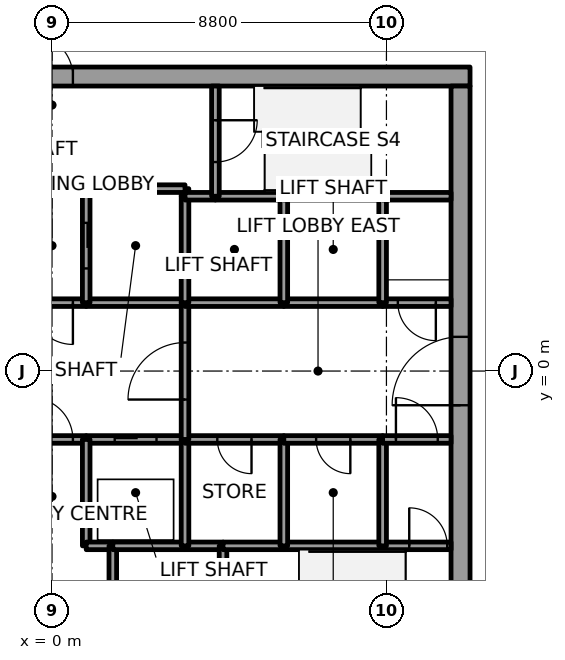
"""IFC4 building model, lengths in metres.
Left out: names, types, materials, properties, quantities, classifications, styles, units other than length and angle.
Written with IfcOpenShell. Run it as: python <this file> out.ifc"""

import sys

from ifc_helpers import new_model, si_unit, direction, frame, frame_2d, origin, place, context, subcontext, project, spatial, rectangle, extrude, element, fill, save


model = new_model("IFC4")
c1 = context("Model", 3, precision=1e-05, world=origin(), true_north=direction((0.0, 1.0)))
c2 = subcontext(c1, "Body", "Model", "MODEL_VIEW")
j1 = project(units=[si_unit("LENGTHUNIT", "METRE"), si_unit("PLANEANGLEUNIT", "RADIAN")], contexts=[c1])
p1 = place(None, origin())
s1 = spatial("IfcSite", under=j1, at=p1, CompositionType="ELEMENT")
p2 = place(p1, origin())
s2 = spatial("IfcBuilding", under=s1, at=p2, CompositionType="ELEMENT")
p3 = place(p2, frame((0.0, 0.0, 22.2)))
s3 = spatial("IfcBuildingStorey", under=s2, at=p3, CompositionType="ELEMENT", Elevation=22.2)
p4 = place(p3, frame((-11.0, 7.75, 0.0), z_axis=(0.0, 0.0, 1.0), x_axis=(1.0, 0.0, 0.0)))
e1 = element("IfcWall", 1, at=p4, inside=s3, PredefinedType="SHEAR", context=c2, shape_type="SweptSolid", body=[
    extrude(rectangle(XDim=22.0, YDim=0.5, at=frame_2d((11.0, 0.0))), origin(), (0.0, 0.0, 1.0), 6.6),
])
p5 = place(p4, frame((10.45, 0.0, 0.0)))
e2 = element("IfcOpeningElement", 2, at=p5, cuts=e1, PredefinedType="OPENING", context=c2, shape_type="SweptSolid", body=[
    extrude(rectangle(XDim=1.1, YDim=2.1, at=frame_2d((0.55, 1.05))), frame((0.0, 0.25, 0.0), z_axis=(0.0, -1.0, 0.0), x_axis=(1.0, 0.0, 0.0)), (0.0, 0.0, 1.0), 0.5),
])
p6 = place(p3, frame((10.75, -7.5, 0.0), z_axis=(0.0, 0.0, 1.0), x_axis=(0.0, 1.0, 0.0)))
e3 = element("IfcWall", 3, at=p6, inside=s3, PredefinedType="SHEAR", context=c2, shape_type="SweptSolid", body=[
    extrude(rectangle(XDim=15.0, YDim=0.5, at=frame_2d((7.5, 0.0))), origin(), (0.0, 0.0, 1.0), 6.6),
])
p7 = place(p6, frame((6.6, 0.0, 0.0)))
e4 = element("IfcOpeningElement", 4, at=p7, cuts=e3, PredefinedType="OPENING", context=c2, shape_type="SweptSolid", body=[
    extrude(rectangle(XDim=1.8, YDim=2.1, at=frame_2d((0.9, 1.05))), frame((0.0, 0.25, 0.0), z_axis=(0.0, -1.0, 0.0), x_axis=(1.0, 0.0, 0.0)), (0.0, 0.0, 1.0), 0.5),
])
p8 = place(p3, frame((-0.9, -1.8, 0.0), z_axis=(0.0, 0.0, 1.0), x_axis=(1.0, 0.0, 0.0)))
e5 = element("IfcWall", 5, at=p8, inside=s3, PredefinedType="SOLIDWALL", context=c2, shape_type="SweptSolid", body=[
    extrude(rectangle(XDim=1.8, YDim=0.2, at=frame_2d((0.9, 0.0))), origin(), (0.0, 0.0, 1.0), 6.35),
])
p9 = place(p8, frame((0.35, 0.0, 0.0)))
e6 = element("IfcOpeningElement", 6, at=p9, cuts=e5, PredefinedType="OPENING", context=c2, shape_type="SweptSolid", body=[
    extrude(rectangle(XDim=1.1, YDim=2.4, at=frame_2d((0.55, 1.2))), frame((0.0, 0.1, 0.0), z_axis=(0.0, -1.0, 0.0), x_axis=(1.0, 0.0, 0.0)), (0.0, 0.0, 1.0), 0.2),
])
p10 = place(p3, frame((0.9, 1.8, 0.0), z_axis=(0.0, 0.0, 1.0), x_axis=(-1.0, 0.0, 0.0)))
e7 = element("IfcWall", 7, at=p10, inside=s3, PredefinedType="SOLIDWALL", context=c2, shape_type="SweptSolid", body=[
    extrude(rectangle(XDim=1.8, YDim=0.2, at=frame_2d((0.9, 0.0))), origin(), (0.0, 0.0, 1.0), 6.35),
])
p11 = place(p10, frame((0.35, 0.0, 0.0)))
e8 = element("IfcOpeningElement", 8, at=p11, cuts=e7, PredefinedType="OPENING", context=c2, shape_type="SweptSolid", body=[
    extrude(rectangle(XDim=1.1, YDim=2.4, at=frame_2d((0.55, 1.2))), frame((0.0, 0.1, 0.0), z_axis=(0.0, -1.0, 0.0), x_axis=(1.0, 0.0, 0.0)), (0.0, 0.0, 1.0), 0.2),
])
p12 = place(p3, frame((0.9, -1.8, 0.0), z_axis=(0.0, 0.0, 1.0), x_axis=(1.0, 0.0, 0.0)))
e9 = element("IfcWall", 9, at=p12, inside=s3, PredefinedType="SOLIDWALL", context=c2, shape_type="SweptSolid", body=[
    extrude(rectangle(XDim=2.6, YDim=0.2, at=frame_2d((1.3, 0.0))), origin(), (0.0, 0.0, 1.0), 6.35),
])
p13 = place(p12, frame((0.75, 0.0, 0.0)))
e10 = element("IfcOpeningElement", 10, at=p13, cuts=e9, PredefinedType="OPENING", context=c2, shape_type="SweptSolid", body=[
    extrude(rectangle(XDim=1.1, YDim=2.1, at=frame_2d((0.55, 1.05))), frame((0.0, 0.1, 0.0), z_axis=(0.0, -1.0, 0.0), x_axis=(1.0, 0.0, 0.0)), (0.0, 0.0, 1.0), 0.2),
])
p14 = place(p3, frame((0.9, -1.8, 0.0), z_axis=(0.0, 0.0, 1.0), x_axis=(0.0, -1.0, 0.0)))
e11 = element("IfcWall", 11, at=p14, inside=s3, PredefinedType="SOLIDWALL", context=c2, shape_type="SweptSolid", body=[
    extrude(rectangle(XDim=2.8, YDim=0.2, at=frame_2d((1.4, 0.0))), origin(), (0.0, 0.0, 1.0), 6.35),
])
p15 = place(p3, frame((0.9, -4.6, 0.0), z_axis=(0.0, 0.0, 1.0), x_axis=(1.0, 0.0, 0.0)))
e12 = element("IfcWall", 12, at=p15, inside=s3, PredefinedType="SOLIDWALL", context=c2, shape_type="SweptSolid", body=[
    extrude(rectangle(XDim=0.7, YDim=0.2, at=frame_2d((0.35, 0.0))), origin(), (0.0, 0.0, 1.0), 6.35),
])
p16 = place(p3, frame((3.5, 1.8, 0.0), z_axis=(0.0, 0.0, 1.0), x_axis=(-1.0, 0.0, 0.0)))
e13 = element("IfcWall", 13, at=p16, inside=s3, PredefinedType="SOLIDWALL", context=c2, shape_type="SweptSolid", body=[
    extrude(rectangle(XDim=2.6, YDim=0.2, at=frame_2d((1.3, 0.0))), origin(), (0.0, 0.0, 1.0), 6.35),
])
p17 = place(p3, frame((3.5, 4.6, 0.0), z_axis=(0.0, 0.0, 1.0), x_axis=(0.0, 1.0, 0.0)))
e14 = element("IfcWall", 14, at=p17, inside=s3, PredefinedType="SOLIDWALL", context=c2, shape_type="SweptSolid", body=[
    extrude(rectangle(XDim=0.2, YDim=0.2, at=frame_2d((0.1, 0.0))), origin(), (0.0, 0.0, 1.0), 6.35),
])
p18 = place(p3, frame((3.5, 4.8, 0.0), z_axis=(0.0, 0.0, 1.0), x_axis=(-1.0, 0.0, 0.0)))
e15 = element("IfcWall", 15, at=p18, inside=s3, PredefinedType="SOLIDWALL", context=c2, shape_type="SweptSolid", body=[
    extrude(rectangle(XDim=2.6, YDim=0.2, at=frame_2d((1.3, 0.0))), origin(), (0.0, 0.0, 1.0), 6.35),
])
p19 = place(p3, frame((0.9, 4.8, 0.0), z_axis=(0.0, 0.0, 1.0), x_axis=(0.0, -1.0, 0.0)))
e16 = element("IfcWall", 16, at=p19, inside=s3, PredefinedType="SOLIDWALL", context=c2, shape_type="SweptSolid", body=[
    extrude(rectangle(XDim=3.0, YDim=0.2, at=frame_2d((1.5, 0.0))), origin(), (0.0, 0.0, 1.0), 6.35),
])
p20 = place(p19, frame((0.9, 0.0, 0.0)))
e17 = element("IfcOpeningElement", 17, at=p20, cuts=e16, PredefinedType="OPENING", context=c2, shape_type="SweptSolid", body=[
    extrude(rectangle(XDim=1.2, YDim=2.1, at=frame_2d((0.6, 1.05))), frame((0.0, 0.1, 0.0), z_axis=(0.0, -1.0, 0.0), x_axis=(1.0, 0.0, 0.0)), (0.0, 0.0, 1.0), 0.2),
])
p21 = place(p3, frame((1.6, -4.6, 0.0), z_axis=(0.0, 0.0, 1.0), x_axis=(0.0, -1.0, 0.0)))
e18 = element("IfcWall", 18, at=p21, inside=s3, PredefinedType="SOLIDWALL", context=c2, shape_type="SweptSolid", body=[
    extrude(rectangle(XDim=2.9, YDim=0.2, at=frame_2d((1.45, 0.0))), origin(), (0.0, 0.0, 1.0), 6.35),
])
p22 = place(p21, frame((1.0, 0.0, 0.0)))
e19 = element("IfcOpeningElement", 19, at=p22, cuts=e18, PredefinedType="OPENING", context=c2, shape_type="SweptSolid", body=[
    extrude(rectangle(XDim=0.9, YDim=2.4, at=frame_2d((0.45, 1.2))), frame((0.0, 0.1, 0.0), z_axis=(0.0, -1.0, 0.0), x_axis=(1.0, 0.0, 0.0)), (0.0, 0.0, 1.0), 0.2),
])
p23 = place(p3, frame((3.5, -4.6, 0.0), z_axis=(0.0, 0.0, 1.0), x_axis=(-1.0, 0.0, 0.0)))
e20 = element("IfcWall", 20, at=p23, inside=s3, PredefinedType="SOLIDWALL", context=c2, shape_type="SweptSolid", body=[
    extrude(rectangle(XDim=1.9, YDim=0.2, at=frame_2d((0.95, 0.0))), origin(), (0.0, 0.0, 1.0), 6.35),
])
p24 = place(p3, frame((3.5, -4.6, 0.0), z_axis=(0.0, 0.0, 1.0), x_axis=(1.0, 0.0, 0.0)))
e21 = element("IfcWall", 21, at=p24, inside=s3, PredefinedType="SOLIDWALL", context=c2, shape_type="SweptSolid", body=[
    extrude(rectangle(XDim=1.0, YDim=0.2, at=frame_2d((0.5, 0.0))), origin(), (0.0, 0.0, 1.0), 6.35),
])
p25 = place(p3, frame((3.5, -1.8, 0.0), z_axis=(0.0, 0.0, 1.0), x_axis=(0.0, -1.0, 0.0)))
e22 = element("IfcWall", 22, at=p25, inside=s3, PredefinedType="SOLIDWALL", context=c2, shape_type="SweptSolid", body=[
    extrude(rectangle(XDim=2.8, YDim=0.2, at=frame_2d((1.4, 0.0))), origin(), (0.0, 0.0, 1.0), 6.35),
])
p26 = place(p3, frame((6.1, -1.8, 0.0), z_axis=(0.0, 0.0, 1.0), x_axis=(-1.0, 0.0, 0.0)))
e23 = element("IfcWall", 23, at=p26, inside=s3, PredefinedType="SOLIDWALL", context=c2, shape_type="SweptSolid", body=[
    extrude(rectangle(XDim=2.6, YDim=0.2, at=frame_2d((1.3, 0.0))), origin(), (0.0, 0.0, 1.0), 6.35),
])
p27 = place(p26, frame((0.85, 0.0, 0.0)))
e24 = element("IfcOpeningElement", 24, at=p27, cuts=e23, PredefinedType="OPENING", context=c2, shape_type="SweptSolid", body=[
    extrude(rectangle(XDim=0.9, YDim=2.4, at=frame_2d((0.45, 1.2))), frame((0.0, 0.1, 0.0), z_axis=(0.0, -1.0, 0.0), x_axis=(1.0, 0.0, 0.0)), (0.0, 0.0, 1.0), 0.2),
])
p28 = place(p3, frame((3.5, -1.8, 0.0), z_axis=(0.0, 0.0, 1.0), x_axis=(0.0, 1.0, 0.0)))
e25 = element("IfcWall", 25, at=p28, inside=s3, PredefinedType="SOLIDWALL", context=c2, shape_type="SweptSolid", body=[
    extrude(rectangle(XDim=3.6, YDim=0.2, at=frame_2d((1.8, 0.0))), origin(), (0.0, 0.0, 1.0), 6.35),
])
p29 = place(p28, frame((1.05, 0.0, 0.0)))
e26 = element("IfcOpeningElement", 26, at=p29, cuts=e25, PredefinedType="OPENING", context=c2, shape_type="SweptSolid", body=[
    extrude(rectangle(XDim=1.5, YDim=2.4, at=frame_2d((0.75, 1.2))), frame((0.0, 0.1, 0.0), z_axis=(0.0, -1.0, 0.0), x_axis=(1.0, 0.0, 0.0)), (0.0, 0.0, 1.0), 0.2),
])
p30 = place(p3, frame((6.1, 1.8, 0.0), z_axis=(0.0, 0.0, 1.0), x_axis=(-1.0, 0.0, 0.0)))
e27 = element("IfcWall", 27, at=p30, inside=s3, PredefinedType="SOLIDWALL", context=c2, shape_type="SweptSolid", body=[
    extrude(rectangle(XDim=2.6, YDim=0.2, at=frame_2d((1.3, 0.0))), origin(), (0.0, 0.0, 1.0), 6.35),
])
p31 = place(p3, frame((3.5, 1.8, 0.0), z_axis=(0.0, 0.0, 1.0), x_axis=(0.0, 1.0, 0.0)))
e28 = element("IfcWall", 28, at=p31, inside=s3, PredefinedType="SOLIDWALL", context=c2, shape_type="SweptSolid", body=[
    extrude(rectangle(XDim=2.8, YDim=0.2, at=frame_2d((1.4, 0.0))), origin(), (0.0, 0.0, 1.0), 6.35),
])
p32 = place(p3, frame((4.3, 4.6, 0.0), z_axis=(0.0, 0.0, 1.0), x_axis=(-1.0, 0.0, 0.0)))
e29 = element("IfcWall", 29, at=p32, inside=s3, PredefinedType="SOLIDWALL", context=c2, shape_type="SweptSolid", body=[
    extrude(rectangle(XDim=0.8, YDim=0.2, at=frame_2d((0.4, 0.0))), origin(), (0.0, 0.0, 1.0), 6.35),
])
p33 = place(p3, frame((6.1, 4.6, 0.0), z_axis=(0.0, 0.0, 1.0), x_axis=(-1.0, 0.0, 0.0)))
e30 = element("IfcWall", 30, at=p33, inside=s3, PredefinedType="SOLIDWALL", context=c2, shape_type="SweptSolid", body=[
    extrude(rectangle(XDim=1.8, YDim=0.2, at=frame_2d((0.9, 0.0))), origin(), (0.0, 0.0, 1.0), 6.35),
])
p34 = place(p3, frame((4.3, 7.5, 0.0), z_axis=(0.0, 0.0, 1.0), x_axis=(0.0, -1.0, 0.0)))
e31 = element("IfcWall", 31, at=p34, inside=s3, PredefinedType="SOLIDWALL", context=c2, shape_type="SweptSolid", body=[
    extrude(rectangle(XDim=2.9, YDim=0.2, at=frame_2d((1.45, 0.0))), origin(), (0.0, 0.0, 1.0), 6.35),
])
p35 = place(p34, frame((0.9, 0.0, 0.0)))
e32 = element("IfcOpeningElement", 32, at=p35, cuts=e31, PredefinedType="OPENING", context=c2, shape_type="SweptSolid", body=[
    extrude(rectangle(XDim=1.1, YDim=2.4, at=frame_2d((0.55, 1.2))), frame((0.0, 0.1, 0.0), z_axis=(0.0, -1.0, 0.0), x_axis=(1.0, 0.0, 0.0)), (0.0, 0.0, 1.0), 0.2),
])
p36 = place(p3, frame((4.5, -7.5, 0.0), z_axis=(0.0, 0.0, 1.0), x_axis=(0.0, 1.0, 0.0)))
e33 = element("IfcWall", 33, at=p36, inside=s3, PredefinedType="SOLIDWALL", context=c2, shape_type="SweptSolid", body=[
    extrude(rectangle(XDim=2.9, YDim=0.2, at=frame_2d((1.45, 0.0))), origin(), (0.0, 0.0, 1.0), 6.35),
])
p37 = place(p3, frame((4.5, -4.6, 0.0), z_axis=(0.0, 0.0, 1.0), x_axis=(1.0, 0.0, 0.0)))
e34 = element("IfcWall", 34, at=p37, inside=s3, PredefinedType="SOLIDWALL", context=c2, shape_type="SweptSolid", body=[
    extrude(rectangle(XDim=1.6, YDim=0.2, at=frame_2d((0.8, 0.0))), origin(), (0.0, 0.0, 1.0), 6.35),
])
p38 = place(p3, frame((6.1, -4.6, 0.0), z_axis=(0.0, 0.0, 1.0), x_axis=(1.0, 0.0, 0.0)))
e35 = element("IfcWall", 35, at=p38, inside=s3, PredefinedType="SOLIDWALL", context=c2, shape_type="SweptSolid", body=[
    extrude(rectangle(XDim=2.6, YDim=0.2, at=frame_2d((1.3, 0.0))), origin(), (0.0, 0.0, 1.0), 6.35),
])
p39 = place(p3, frame((6.1, -4.6, 0.0), z_axis=(0.0, 0.0, 1.0), x_axis=(0.0, 1.0, 0.0)))
e36 = element("IfcWall", 36, at=p39, inside=s3, PredefinedType="SOLIDWALL", context=c2, shape_type="SweptSolid", body=[
    extrude(rectangle(XDim=2.8, YDim=0.2, at=frame_2d((1.4, 0.0))), origin(), (0.0, 0.0, 1.0), 6.35),
])
p40 = place(p3, frame((8.7, -1.8, 0.0), z_axis=(0.0, 0.0, 1.0), x_axis=(-1.0, 0.0, 0.0)))
e37 = element("IfcWall", 37, at=p40, inside=s3, PredefinedType="SOLIDWALL", context=c2, shape_type="SweptSolid", body=[
    extrude(rectangle(XDim=2.6, YDim=0.2, at=frame_2d((1.3, 0.0))), origin(), (0.0, 0.0, 1.0), 6.35),
])
p41 = place(p40, frame((0.85, 0.0, 0.0)))
e38 = element("IfcOpeningElement", 38, at=p41, cuts=e37, PredefinedType="OPENING", context=c2, shape_type="SweptSolid", body=[
    extrude(rectangle(XDim=0.9, YDim=2.4, at=frame_2d((0.45, 1.2))), frame((0.0, 0.1, 0.0), z_axis=(0.0, -1.0, 0.0), x_axis=(1.0, 0.0, 0.0)), (0.0, 0.0, 1.0), 0.2),
])
p42 = place(p3, frame((8.7, 1.8, 0.0), z_axis=(0.0, 0.0, 1.0), x_axis=(-1.0, 0.0, 0.0)))
e39 = element("IfcWall", 39, at=p42, inside=s3, PredefinedType="SOLIDWALL", context=c2, shape_type="SweptSolid", body=[
    extrude(rectangle(XDim=2.6, YDim=0.2, at=frame_2d((1.3, 0.0))), origin(), (0.0, 0.0, 1.0), 6.35),
])
p43 = place(p3, frame((6.1, 1.8, 0.0), z_axis=(0.0, 0.0, 1.0), x_axis=(0.0, 1.0, 0.0)))
e40 = element("IfcWall", 40, at=p43, inside=s3, PredefinedType="SOLIDWALL", context=c2, shape_type="SweptSolid", body=[
    extrude(rectangle(XDim=2.8, YDim=0.2, at=frame_2d((1.4, 0.0))), origin(), (0.0, 0.0, 1.0), 6.35),
])
p44 = place(p3, frame((8.7, 4.6, 0.0), z_axis=(0.0, 0.0, 1.0), x_axis=(-1.0, 0.0, 0.0)))
e41 = element("IfcWall", 41, at=p44, inside=s3, PredefinedType="SOLIDWALL", context=c2, shape_type="SweptSolid", body=[
    extrude(rectangle(XDim=2.6, YDim=0.2, at=frame_2d((1.3, 0.0))), origin(), (0.0, 0.0, 1.0), 6.35),
])
p45 = place(p3, frame((8.7, -4.6, 0.0), z_axis=(0.0, 0.0, 1.0), x_axis=(1.0, 0.0, 0.0)))
e42 = element("IfcWall", 42, at=p45, inside=s3, PredefinedType="SOLIDWALL", context=c2, shape_type="SweptSolid", body=[
    extrude(rectangle(XDim=1.8, YDim=0.2, at=frame_2d((0.9, 0.0))), origin(), (0.0, 0.0, 1.0), 6.35),
])
p46 = place(p45, frame((0.7, 0.0, 0.0)))
e43 = element("IfcOpeningElement", 43, at=p46, cuts=e42, PredefinedType="OPENING", context=c2, shape_type="SweptSolid", body=[
    extrude(rectangle(XDim=1.0, YDim=2.1, at=frame_2d((0.5, 1.05))), frame((0.0, 0.1, 0.0), z_axis=(0.0, -1.0, 0.0), x_axis=(1.0, 0.0, 0.0)), (0.0, 0.0, 1.0), 0.2),
])
p47 = place(p3, frame((8.7, -4.6, 0.0), z_axis=(0.0, 0.0, 1.0), x_axis=(0.0, 1.0, 0.0)))
e44 = element("IfcWall", 44, at=p47, inside=s3, PredefinedType="SOLIDWALL", context=c2, shape_type="SweptSolid", body=[
    extrude(rectangle(XDim=2.8, YDim=0.2, at=frame_2d((1.4, 0.0))), origin(), (0.0, 0.0, 1.0), 6.35),
])
p48 = place(p3, frame((8.7, -1.8, 0.0), z_axis=(0.0, 0.0, 1.0), x_axis=(1.0, 0.0, 0.0)))
e45 = element("IfcWall", 45, at=p48, inside=s3, PredefinedType="SOLIDWALL", context=c2, shape_type="SweptSolid", body=[
    extrude(rectangle(XDim=1.8, YDim=0.2, at=frame_2d((0.9, 0.0))), origin(), (0.0, 0.0, 1.0), 6.35),
])
p49 = place(p48, frame((0.35, 0.0, 0.0)))
e46 = element("IfcOpeningElement", 46, at=p49, cuts=e45, PredefinedType="OPENING", context=c2, shape_type="SweptSolid", body=[
    extrude(rectangle(XDim=1.1, YDim=2.4, at=frame_2d((0.55, 1.2))), frame((0.0, 0.1, 0.0), z_axis=(0.0, -1.0, 0.0), x_axis=(1.0, 0.0, 0.0)), (0.0, 0.0, 1.0), 0.2),
])
p50 = place(p3, frame((10.5, 1.8, 0.0), z_axis=(0.0, 0.0, 1.0), x_axis=(-1.0, 0.0, 0.0)))
e47 = element("IfcWall", 47, at=p50, inside=s3, PredefinedType="SOLIDWALL", context=c2, shape_type="SweptSolid", body=[
    extrude(rectangle(XDim=1.8, YDim=0.2, at=frame_2d((0.9, 0.0))), origin(), (0.0, 0.0, 1.0), 6.35),
])
p51 = place(p50, frame((0.4, 0.0, 0.0)))
e48 = element("IfcOpeningElement", 48, at=p51, cuts=e47, PredefinedType="OPENING", context=c2, shape_type="SweptSolid", body=[
    extrude(rectangle(XDim=1.0, YDim=2.4, at=frame_2d((0.5, 1.2))), frame((0.0, 0.1, 0.0), z_axis=(0.0, -1.0, 0.0), x_axis=(1.0, 0.0, 0.0)), (0.0, 0.0, 1.0), 0.2),
])
p52 = place(p3, frame((8.7, 4.6, 0.0), z_axis=(0.0, 0.0, 1.0), x_axis=(0.0, -1.0, 0.0)))
e49 = element("IfcWall", 49, at=p52, inside=s3, PredefinedType="SOLIDWALL", context=c2, shape_type="SweptSolid", body=[
    extrude(rectangle(XDim=2.8, YDim=0.2, at=frame_2d((1.4, 0.0))), origin(), (0.0, 0.0, 1.0), 6.35),
])
p53 = place(p3, frame((10.5, 4.6, 0.0), z_axis=(0.0, 0.0, 1.0), x_axis=(-1.0, 0.0, 0.0)))
e50 = element("IfcWall", 50, at=p53, inside=s3, PredefinedType="SOLIDWALL", context=c2, shape_type="SweptSolid", body=[
    extrude(rectangle(XDim=1.8, YDim=0.2, at=frame_2d((0.9, 0.0))), origin(), (0.0, 0.0, 1.0), 6.35),
])
p54 = place(p13, origin())
e51 = element("IfcDoor", 51, at=p54, inside=s3, OperationType="SLIDING_TO_LEFT", PredefinedType="DOOR", context=c2, shape_type="SweptSolid", body=[
    extrude(rectangle(XDim=1.1, YDim=2.1, at=frame_2d((0.55, 1.05))), frame((0.0, 0.025, 0.0), z_axis=(0.0, -1.0, 0.0), x_axis=(1.0, 0.0, 0.0)), (0.0, 0.0, 1.0), 0.05),
])
fill(e10, e51)
p55 = place(p20, origin())
e52 = element("IfcDoor", 52, at=p55, inside=s3, OperationType="SLIDING_TO_LEFT", PredefinedType="DOOR", context=c2, shape_type="SweptSolid", body=[
    extrude(rectangle(XDim=1.2, YDim=2.1, at=frame_2d((0.6, 1.05))), frame((0.0, 0.025, 0.0), z_axis=(0.0, -1.0, 0.0), x_axis=(1.0, 0.0, 0.0)), (0.0, 0.0, 1.0), 0.05),
])
fill(e17, e52)
p56 = place(p29, origin())
e53 = element("IfcDoor", 53, at=p56, inside=s3, OperationType="DOUBLE_DOOR_SINGLE_SWING", PredefinedType="DOOR", context=c2, shape_type="SweptSolid", body=[
    extrude(rectangle(XDim=1.5, YDim=2.4, at=frame_2d((0.75, 1.2))), frame((0.0, 0.025, 0.0), z_axis=(0.0, -1.0, 0.0), x_axis=(1.0, 0.0, 0.0)), (0.0, 0.0, 1.0), 0.05),
])
fill(e26, e53)
p57 = place(p49, origin())
e54 = element("IfcDoor", 54, at=p57, inside=s3, OperationType="SINGLE_SWING_RIGHT", PredefinedType="DOOR", context=c2, shape_type="SweptSolid", body=[
    extrude(rectangle(XDim=1.1, YDim=2.4, at=frame_2d((0.55, 1.2))), frame((0.0, 0.025, 0.0), z_axis=(0.0, -1.0, 0.0), x_axis=(1.0, 0.0, 0.0)), (0.0, 0.0, 1.0), 0.05),
])
fill(e46, e54)
p58 = place(p11, origin())
e55 = element("IfcDoor", 55, at=p58, inside=s3, OperationType="SINGLE_SWING_LEFT", PredefinedType="DOOR", context=c2, shape_type="SweptSolid", body=[
    extrude(rectangle(XDim=1.1, YDim=2.4, at=frame_2d((0.55, 1.2))), frame((0.0, 0.025, 0.0), z_axis=(0.0, -1.0, 0.0), x_axis=(1.0, 0.0, 0.0)), (0.0, 0.0, 1.0), 0.05),
])
fill(e8, e55)
p59 = place(p9, origin())
e56 = element("IfcDoor", 56, at=p59, inside=s3, OperationType="SINGLE_SWING_RIGHT", PredefinedType="DOOR", context=c2, shape_type="SweptSolid", body=[
    extrude(rectangle(XDim=1.1, YDim=2.4, at=frame_2d((0.55, 1.2))), frame((0.0, 0.025, 0.0), z_axis=(0.0, -1.0, 0.0), x_axis=(1.0, 0.0, 0.0)), (0.0, 0.0, 1.0), 0.05),
])
fill(e6, e56)
p60 = place(p51, origin())
e57 = element("IfcDoor", 57, at=p60, inside=s3, OperationType="SINGLE_SWING_LEFT", PredefinedType="DOOR", context=c2, shape_type="SweptSolid", body=[
    extrude(rectangle(XDim=1.0, YDim=2.4, at=frame_2d((0.5, 1.2))), frame((0.0, 0.025, 0.0), z_axis=(0.0, -1.0, 0.0), x_axis=(1.0, 0.0, 0.0)), (0.0, 0.0, 1.0), 0.05),
])
fill(e48, e57)
p61 = place(p46, origin())
e58 = element("IfcDoor", 58, at=p61, inside=s3, OperationType="SINGLE_SWING_RIGHT", PredefinedType="DOOR", context=c2, shape_type="SweptSolid", body=[
    extrude(rectangle(XDim=1.0, YDim=2.1, at=frame_2d((0.5, 1.05))), frame((0.0, 0.025, 0.0), z_axis=(0.0, -1.0, 0.0), x_axis=(1.0, 0.0, 0.0)), (0.0, 0.0, 1.0), 0.05),
])
fill(e43, e58)
p62 = place(p35, origin())
e59 = element("IfcDoor", 59, at=p62, inside=s3, OperationType="SINGLE_SWING_RIGHT", PredefinedType="DOOR", context=c2, shape_type="SweptSolid", body=[
    extrude(rectangle(XDim=1.1, YDim=2.4, at=frame_2d((0.55, 1.2))), frame((0.0, 0.025, 0.0), z_axis=(0.0, -1.0, 0.0), x_axis=(1.0, 0.0, 0.0)), (0.0, 0.0, 1.0), 0.05),
])
fill(e32, e59)
p63 = place(p27, origin())
e60 = element("IfcDoor", 60, at=p63, inside=s3, OperationType="SINGLE_SWING_LEFT", PredefinedType="DOOR", context=c2, shape_type="SweptSolid", body=[
    extrude(rectangle(XDim=0.9, YDim=2.4, at=frame_2d((0.45, 1.2))), frame((0.0, 0.025, 0.0), z_axis=(0.0, -1.0, 0.0), x_axis=(1.0, 0.0, 0.0)), (0.0, 0.0, 1.0), 0.05),
])
fill(e24, e60)
p64 = place(p41, origin())
e61 = element("IfcDoor", 61, at=p64, inside=s3, OperationType="SINGLE_SWING_LEFT", PredefinedType="DOOR", context=c2, shape_type="SweptSolid", body=[
    extrude(rectangle(XDim=0.9, YDim=2.4, at=frame_2d((0.45, 1.2))), frame((0.0, 0.025, 0.0), z_axis=(0.0, -1.0, 0.0), x_axis=(1.0, 0.0, 0.0)), (0.0, 0.0, 1.0), 0.05),
])
fill(e38, e61)
p65 = place(p7, origin())
e62 = element("IfcDoor", 62, at=p65, inside=s3, OperationType="DOUBLE_DOOR_SINGLE_SWING", PredefinedType="DOOR", context=c2, shape_type="SweptSolid", body=[
    extrude(rectangle(XDim=1.8, YDim=2.1, at=frame_2d((0.9, 1.05))), frame((0.0, 0.025, 0.0), z_axis=(0.0, -1.0, 0.0), x_axis=(1.0, 0.0, 0.0)), (0.0, 0.0, 1.0), 0.05),
])
fill(e4, e62)
p66 = place(p5, origin())
e63 = element("IfcDoor", 63, at=p66, inside=s3, OperationType="SINGLE_SWING_LEFT", PredefinedType="DOOR", context=c2, shape_type="SweptSolid", body=[
    extrude(rectangle(XDim=1.1, YDim=2.1, at=frame_2d((0.55, 1.05))), frame((0.0, 0.025, 0.0), z_axis=(0.0, -1.0, 0.0), x_axis=(1.0, 0.0, 0.0)), (0.0, 0.0, 1.0), 0.05),
])
fill(e2, e63)
save(model, sys.argv[1])
